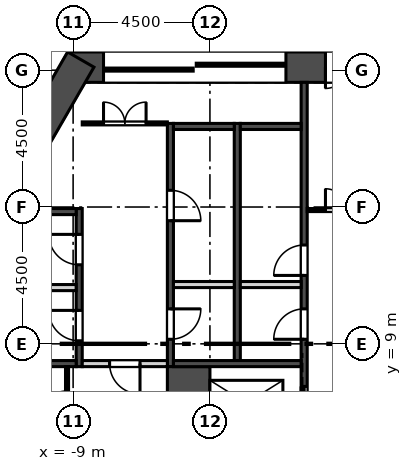
"""IFC4 building model, lengths in metres.
Left out: names, types, materials, properties, quantities, classifications, styles, units other than length and angle.
Written with IfcOpenShell. Run it as: python <this file> out.ifc"""

import sys

from ifc_helpers import new_model, si_unit, direction, frame, frame_2d, origin, place, context, subcontext, project, spatial, rectangle, extrude, element, fill, save


model = new_model("IFC4")
c1 = context("Model", 3, precision=1e-05, world=origin(), true_north=direction((0.0, 1.0)))
c2 = subcontext(c1, "Body", "Model", "MODEL_VIEW")
j1 = project(units=[si_unit("LENGTHUNIT", "METRE"), si_unit("PLANEANGLEUNIT", "RADIAN")], contexts=[c1])
p1 = place(None, origin())
s1 = spatial("IfcSite", under=j1, at=p1, CompositionType="ELEMENT")
p2 = place(p1, origin())
s2 = spatial("IfcBuilding", under=s1, at=p2, CompositionType="ELEMENT")
p3 = place(p2, frame((0.0, 0.0, 218.1)))
s3 = spatial("IfcBuildingStorey", under=s2, at=p3, CompositionType="ELEMENT", Elevation=218.1)
p4 = place(p3, frame((9.181, 18.1, 0.0), z_axis=(0.0, 0.0, 1.0), x_axis=(-1.0, 0.0, 0.0)))
e1 = element("IfcWall", 1, at=p4, inside=s3, PredefinedType="SHEAR", context=c2, shape_type="SweptSolid", body=[
    extrude(rectangle(XDim=18.361, YDim=1.0, at=frame_2d((9.181, 0.0))), origin(), (0.0, 0.0, 1.0), 5.4),
])
p5 = place(p4, frame((8.481, 0.0, 0.0)))
e2 = element("IfcOpeningElement", 2, at=p5, cuts=e1, PredefinedType="OPENING", context=c2, shape_type="SweptSolid", body=[
    extrude(rectangle(XDim=1.4, YDim=2.1, at=frame_2d((0.7, 1.05))), frame((0.0, 0.51, 0.0), z_axis=(0.0, -1.0, 0.0), x_axis=(1.0, 0.0, 0.0)), (0.0, 0.0, 1.0), 1.02),
])
p6 = place(p4, frame((11.181, 0.0, 0.0)))
e3 = element("IfcOpeningElement", 3, at=p6, cuts=e1, PredefinedType="OPENING", context=c2, shape_type="SweptSolid", body=[
    extrude(rectangle(XDim=6.0, YDim=2.4, at=frame_2d((3.0, 1.2))), frame((0.0, 0.51, 0.0), z_axis=(0.0, -1.0, 0.0), x_axis=(1.0, 0.0, 0.0)), (0.0, 0.0, 1.0), 1.02),
])
p7 = place(p4, frame((1.181, 0.0, 0.0)))
e4 = element("IfcOpeningElement", 4, at=p7, cuts=e1, PredefinedType="OPENING", context=c2, shape_type="SweptSolid", body=[
    extrude(rectangle(XDim=6.0, YDim=2.4, at=frame_2d((3.0, 1.2))), frame((0.0, 0.51, 0.0), z_axis=(0.0, -1.0, 0.0), x_axis=(1.0, 0.0, 0.0)), (0.0, 0.0, 1.0), 1.02),
])
p8 = place(p3, frame((-8.748, 18.35, 0.0), z_axis=(0.0, 0.0, 1.0), x_axis=(-0.499995021168, -0.866028278295, 0.0)))
e5 = element("IfcWall", 5, at=p8, inside=s3, PredefinedType="SHEAR", context=c2, shape_type="SweptSolid", body=[
    extrude(rectangle(XDim=8.839, YDim=1.0, at=frame_2d((4.419, 0.0))), origin(), (0.0, 0.0, 1.0), 5.4),
])
p9 = place(p3, frame((-4.353, 47.177, 0.0), z_axis=(0.0, 0.0, 1.0), x_axis=(-0.500000533701, -0.866025095652, 0.0)))
e6 = element("IfcWall", 6, at=p9, inside=s3, PredefinedType="SOLIDWALL", context=c2, shape_type="SweptSolid", body=[
    extrude(rectangle(XDim=45.573, YDim=0.34, at=frame_2d((22.787, 0.0))), origin(), (0.0, 0.0, 1.0), 5.0),
])
p10 = place(p9, frame((2.68, 0.0, 0.9)))
e7 = element("IfcOpeningElement", 7, at=p10, cuts=e6, PredefinedType="OPENING", context=c2, shape_type="SweptSolid", body=[
    extrude(rectangle(XDim=1.885, YDim=3.0, at=frame_2d((0.942, 1.5))), frame((0.0, 0.18, 0.0), z_axis=(0.0, -1.0, 0.0), x_axis=(1.0, 0.0, 0.0)), (0.0, 0.0, 1.0), 0.36),
])
p11 = place(p9, frame((5.68, 0.0, 0.9)))
e8 = element("IfcOpeningElement", 8, at=p11, cuts=e6, PredefinedType="OPENING", context=c2, shape_type="SweptSolid", body=[
    extrude(rectangle(XDim=1.885, YDim=3.0, at=frame_2d((0.942, 1.5))), frame((0.0, 0.18, 0.0), z_axis=(0.0, -1.0, 0.0), x_axis=(1.0, 0.0, 0.0)), (0.0, 0.0, 1.0), 0.36),
])
p12 = place(p9, frame((8.68, 0.0, 0.9)))
e9 = element("IfcOpeningElement", 9, at=p12, cuts=e6, PredefinedType="OPENING", context=c2, shape_type="SweptSolid", body=[
    extrude(rectangle(XDim=1.885, YDim=3.0, at=frame_2d((0.942, 1.5))), frame((0.0, 0.18, 0.0), z_axis=(0.0, -1.0, 0.0), x_axis=(1.0, 0.0, 0.0)), (0.0, 0.0, 1.0), 0.36),
])
p13 = place(p9, frame((11.68, 0.0, 0.9)))
e10 = element("IfcOpeningElement", 10, at=p13, cuts=e6, PredefinedType="OPENING", context=c2, shape_type="SweptSolid", body=[
    extrude(rectangle(XDim=1.885, YDim=3.0, at=frame_2d((0.942, 1.5))), frame((0.0, 0.18, 0.0), z_axis=(0.0, -1.0, 0.0), x_axis=(1.0, 0.0, 0.0)), (0.0, 0.0, 1.0), 0.36),
])
p14 = place(p9, frame((14.68, 0.0, 0.9)))
e11 = element("IfcOpeningElement", 11, at=p14, cuts=e6, PredefinedType="OPENING", context=c2, shape_type="SweptSolid", body=[
    extrude(rectangle(XDim=1.885, YDim=3.0, at=frame_2d((0.942, 1.5))), frame((0.0, 0.18, 0.0), z_axis=(0.0, -1.0, 0.0), x_axis=(1.0, 0.0, 0.0)), (0.0, 0.0, 1.0), 0.36),
])
p15 = place(p9, frame((17.68, 0.0, 0.9)))
e12 = element("IfcOpeningElement", 12, at=p15, cuts=e6, PredefinedType="OPENING", context=c2, shape_type="SweptSolid", body=[
    extrude(rectangle(XDim=1.885, YDim=3.0, at=frame_2d((0.942, 1.5))), frame((0.0, 0.18, 0.0), z_axis=(0.0, -1.0, 0.0), x_axis=(1.0, 0.0, 0.0)), (0.0, 0.0, 1.0), 0.36),
])
p16 = place(p9, frame((20.68, 0.0, 0.9)))
e13 = element("IfcOpeningElement", 13, at=p16, cuts=e6, PredefinedType="OPENING", context=c2, shape_type="SweptSolid", body=[
    extrude(rectangle(XDim=1.885, YDim=3.0, at=frame_2d((0.942, 1.5))), frame((0.0, 0.18, 0.0), z_axis=(0.0, -1.0, 0.0), x_axis=(1.0, 0.0, 0.0)), (0.0, 0.0, 1.0), 0.36),
])
p17 = place(p9, frame((23.68, 0.0, 0.9)))
e14 = element("IfcOpeningElement", 14, at=p17, cuts=e6, PredefinedType="OPENING", context=c2, shape_type="SweptSolid", body=[
    extrude(rectangle(XDim=1.885, YDim=3.0, at=frame_2d((0.942, 1.5))), frame((0.0, 0.18, 0.0), z_axis=(0.0, -1.0, 0.0), x_axis=(1.0, 0.0, 0.0)), (0.0, 0.0, 1.0), 0.36),
])
p18 = place(p9, frame((26.68, 0.0, 0.9)))
e15 = element("IfcOpeningElement", 15, at=p18, cuts=e6, PredefinedType="OPENING", context=c2, shape_type="SweptSolid", body=[
    extrude(rectangle(XDim=1.885, YDim=3.0, at=frame_2d((0.942, 1.5))), frame((0.0, 0.18, 0.0), z_axis=(0.0, -1.0, 0.0), x_axis=(1.0, 0.0, 0.0)), (0.0, 0.0, 1.0), 0.36),
])
p19 = place(p9, frame((29.68, 0.0, 0.9)))
e16 = element("IfcOpeningElement", 16, at=p19, cuts=e6, PredefinedType="OPENING", context=c2, shape_type="SweptSolid", body=[
    extrude(rectangle(XDim=1.885, YDim=3.0, at=frame_2d((0.942, 1.5))), frame((0.0, 0.18, 0.0), z_axis=(0.0, -1.0, 0.0), x_axis=(1.0, 0.0, 0.0)), (0.0, 0.0, 1.0), 0.36),
])
p20 = place(p9, frame((32.68, 0.0, 0.9)))
e17 = element("IfcOpeningElement", 17, at=p20, cuts=e6, PredefinedType="OPENING", context=c2, shape_type="SweptSolid", body=[
    extrude(rectangle(XDim=1.885, YDim=3.0, at=frame_2d((0.942, 1.5))), frame((0.0, 0.18, 0.0), z_axis=(0.0, -1.0, 0.0), x_axis=(1.0, 0.0, 0.0)), (0.0, 0.0, 1.0), 0.36),
])
p21 = place(p9, frame((35.68, 0.0, 0.9)))
e18 = element("IfcOpeningElement", 18, at=p21, cuts=e6, PredefinedType="OPENING", context=c2, shape_type="SweptSolid", body=[
    extrude(rectangle(XDim=1.885, YDim=3.0, at=frame_2d((0.942, 1.5))), frame((0.0, 0.18, 0.0), z_axis=(0.0, -1.0, 0.0), x_axis=(1.0, 0.0, 0.0)), (0.0, 0.0, 1.0), 0.36),
])
p22 = place(p9, frame((38.68, 0.0, 0.9)))
e19 = element("IfcOpeningElement", 19, at=p22, cuts=e6, PredefinedType="OPENING", context=c2, shape_type="SweptSolid", body=[
    extrude(rectangle(XDim=1.885, YDim=3.0, at=frame_2d((0.942, 1.5))), frame((0.0, 0.18, 0.0), z_axis=(0.0, -1.0, 0.0), x_axis=(1.0, 0.0, 0.0)), (0.0, 0.0, 1.0), 0.36),
])
p23 = place(p9, frame((41.68, 0.0, 0.9)))
e20 = element("IfcOpeningElement", 20, at=p23, cuts=e6, PredefinedType="OPENING", context=c2, shape_type="SweptSolid", body=[
    extrude(rectangle(XDim=1.885, YDim=3.0, at=frame_2d((0.942, 1.5))), frame((0.0, 0.18, 0.0), z_axis=(0.0, -1.0, 0.0), x_axis=(1.0, 0.0, 0.0)), (0.0, 0.0, 1.0), 0.36),
])
p24 = place(p3, frame((-8.8, 8.25, -0.4), z_axis=(0.0, 0.0, 1.0), x_axis=(0.0, 1.0, 0.0)))
e21 = element("IfcWall", 21, at=p24, inside=s3, PredefinedType="SOLIDWALL", context=c2, shape_type="SweptSolid", body=[
    extrude(rectangle(XDim=5.2, YDim=0.2, at=frame_2d((2.6, 0.0))), origin(), (0.0, 0.0, 1.0), 5.4),
])
p25 = place(p24, frame((0.85, 0.0, 0.4)))
e22 = element("IfcOpeningElement", 22, at=p25, cuts=e21, PredefinedType="OPENING", context=c2, shape_type="SweptSolid", body=[
    extrude(rectangle(XDim=1.0, YDim=2.1, at=frame_2d((0.5, 1.05))), frame((0.0, 0.11, 0.0), z_axis=(0.0, -1.0, 0.0), x_axis=(1.0, 0.0, 0.0)), (0.0, 0.0, 1.0), 0.22),
])
p26 = place(p24, frame((3.35, 0.0, 0.4)))
e23 = element("IfcOpeningElement", 23, at=p26, cuts=e21, PredefinedType="OPENING", context=c2, shape_type="SweptSolid", body=[
    extrude(rectangle(XDim=1.0, YDim=2.1, at=frame_2d((0.5, 1.05))), frame((0.0, 0.11, 0.0), z_axis=(0.0, -1.0, 0.0), x_axis=(1.0, 0.0, 0.0)), (0.0, 0.0, 1.0), 0.22),
])
p27 = place(p3, frame((-5.8, 8.25, -0.4), z_axis=(0.0, 0.0, 1.0), x_axis=(0.0, 1.0, 0.0)))
e24 = element("IfcWall", 24, at=p27, inside=s3, PredefinedType="SOLIDWALL", context=c2, shape_type="SweptSolid", body=[
    extrude(rectangle(XDim=8.0, YDim=0.2, at=frame_2d((4.0, 0.0))), origin(), (0.0, 0.0, 1.0), 5.4),
])
p28 = place(p27, frame((0.9, 0.0, 0.4)))
e25 = element("IfcOpeningElement", 25, at=p28, cuts=e24, PredefinedType="OPENING", context=c2, shape_type="SweptSolid", body=[
    extrude(rectangle(XDim=1.0, YDim=2.1, at=frame_2d((0.5, 1.05))), frame((0.0, 0.11, 0.0), z_axis=(0.0, -1.0, 0.0), x_axis=(1.0, 0.0, 0.0)), (0.0, 0.0, 1.0), 0.22),
])
p29 = place(p27, frame((4.8, 0.0, 0.4)))
e26 = element("IfcOpeningElement", 26, at=p29, cuts=e24, PredefinedType="OPENING", context=c2, shape_type="SweptSolid", body=[
    extrude(rectangle(XDim=1.0, YDim=2.1, at=frame_2d((0.5, 1.05))), frame((0.0, 0.11, 0.0), z_axis=(0.0, -1.0, 0.0), x_axis=(1.0, 0.0, 0.0)), (0.0, 0.0, 1.0), 0.22),
])
p30 = place(p3, frame((-3.6, 8.45, -0.4), z_axis=(0.0, 0.0, 1.0), x_axis=(0.0, 1.0, 0.0)))
e27 = element("IfcWall", 27, at=p30, inside=s3, PredefinedType="SOLIDWALL", context=c2, shape_type="SweptSolid", body=[
    extrude(rectangle(XDim=7.8, YDim=0.2, at=frame_2d((3.9, 0.0))), origin(), (0.0, 0.0, 1.0), 5.4),
])
p31 = place(p3, frame((-1.4, 5.85, -0.4), z_axis=(0.0, 0.0, 1.0), x_axis=(0.0, 1.0, 0.0)))
e28 = element("IfcWall", 28, at=p31, inside=s3, PredefinedType="SOLIDWALL", context=c2, shape_type="SweptSolid", body=[
    extrude(rectangle(XDim=11.75, YDim=0.2, at=frame_2d((5.875, 0.0))), origin(), (0.0, 0.0, 1.0), 5.4),
])
p32 = place(p31, frame((0.65, 0.0, 0.4)))
e29 = element("IfcOpeningElement", 29, at=p32, cuts=e28, PredefinedType="OPENING", context=c2, shape_type="SweptSolid", body=[
    extrude(rectangle(XDim=1.1, YDim=2.1, at=frame_2d((0.55, 1.05))), frame((0.0, 0.11, 0.0), z_axis=(0.0, -1.0, 0.0), x_axis=(1.0, 0.0, 0.0)), (0.0, 0.0, 1.0), 0.22),
])
p33 = place(p31, frame((3.3, 0.0, 0.4)))
e30 = element("IfcOpeningElement", 30, at=p33, cuts=e28, PredefinedType="OPENING", context=c2, shape_type="SweptSolid", body=[
    extrude(rectangle(XDim=1.0, YDim=2.1, at=frame_2d((0.5, 1.05))), frame((0.0, 0.11, 0.0), z_axis=(0.0, -1.0, 0.0), x_axis=(1.0, 0.0, 0.0)), (0.0, 0.0, 1.0), 0.22),
])
p34 = place(p31, frame((5.4, 0.0, 0.4)))
e31 = element("IfcOpeningElement", 31, at=p34, cuts=e28, PredefinedType="OPENING", context=c2, shape_type="SweptSolid", body=[
    extrude(rectangle(XDim=1.0, YDim=2.1, at=frame_2d((0.5, 1.05))), frame((0.0, 0.11, 0.0), z_axis=(0.0, -1.0, 0.0), x_axis=(1.0, 0.0, 0.0)), (0.0, 0.0, 1.0), 0.22),
])
p35 = place(p3, frame((-5.2, 5.85, -0.4), z_axis=(0.0, 0.0, 1.0), x_axis=(0.0, 1.0, 0.0)))
e32 = element("IfcWall", 32, at=p35, inside=s3, PredefinedType="SOLIDWALL", context=c2, shape_type="SweptSolid", body=[
    extrude(rectangle(XDim=2.4, YDim=1.4, at=frame_2d((1.2, 0.0))), origin(), (0.0, 0.0, 1.0), 5.4),
])
p36 = place(p3, frame((-10.9, 8.35, -0.4), z_axis=(0.0, 0.0, 1.0), x_axis=(1.0, 0.0, 0.0)))
e33 = element("IfcWall", 33, at=p36, inside=s3, PredefinedType="SOLIDWALL", context=c2, shape_type="SweptSolid", body=[
    extrude(rectangle(XDim=2.0, YDim=0.2, at=frame_2d((1.0, 0.0))), origin(), (0.0, 0.0, 1.0), 5.4),
])
p37 = place(p3, frame((-5.7, 8.35, -0.4), z_axis=(0.0, 0.0, 1.0), x_axis=(1.0, 0.0, 0.0)))
e34 = element("IfcWall", 34, at=p37, inside=s3, PredefinedType="SOLIDWALL", context=c2, shape_type="SweptSolid", body=[
    extrude(rectangle(XDim=4.2, YDim=0.2, at=frame_2d((2.1, 0.0))), origin(), (0.0, 0.0, 1.0), 5.4),
])
p38 = place(p3, frame((-10.9, 10.85, 0.0), z_axis=(0.0, 0.0, 1.0), x_axis=(1.0, 0.0, 0.0)))
e35 = element("IfcWall", 35, at=p38, inside=s3, PredefinedType="SOLIDWALL", context=c2, shape_type="SweptSolid", body=[
    extrude(rectangle(XDim=2.0, YDim=0.2, at=frame_2d((1.0, 0.0))), origin(), (0.0, 0.0, 1.0), 5.0),
])
p39 = place(p3, frame((-10.9, 13.35, -0.4), z_axis=(0.0, 0.0, 1.0), x_axis=(1.0, 0.0, 0.0)))
e36 = element("IfcWall", 36, at=p39, inside=s3, PredefinedType="SOLIDWALL", context=c2, shape_type="SweptSolid", body=[
    extrude(rectangle(XDim=2.0, YDim=0.2, at=frame_2d((1.0, 0.0))), origin(), (0.0, 0.0, 1.0), 5.4),
])
p40 = place(p3, frame((-5.7, 10.95, 0.0), z_axis=(0.0, 0.0, 1.0), x_axis=(1.0, 0.0, 0.0)))
e37 = element("IfcWall", 37, at=p40, inside=s3, PredefinedType="SOLIDWALL", context=c2, shape_type="SweptSolid", body=[
    extrude(rectangle(XDim=2.0, YDim=0.2, at=frame_2d((1.0, 0.0))), origin(), (0.0, 0.0, 1.0), 5.0),
])
p41 = place(p3, frame((-5.7, 16.15, -0.4), z_axis=(0.0, 0.0, 1.0), x_axis=(1.0, 0.0, 0.0)))
e38 = element("IfcWall", 38, at=p41, inside=s3, PredefinedType="SOLIDWALL", context=c2, shape_type="SweptSolid", body=[
    extrude(rectangle(XDim=2.0, YDim=0.2, at=frame_2d((1.0, 0.0))), origin(), (0.0, 0.0, 1.0), 5.4),
])
p42 = place(p3, frame((-3.5, 10.95, 0.0), z_axis=(0.0, 0.0, 1.0), x_axis=(1.0, 0.0, 0.0)))
e39 = element("IfcWall", 39, at=p42, inside=s3, PredefinedType="SOLIDWALL", context=c2, shape_type="SweptSolid", body=[
    extrude(rectangle(XDim=2.0, YDim=0.2, at=frame_2d((1.0, 0.0))), origin(), (0.0, 0.0, 1.0), 5.0),
])
p43 = place(p3, frame((-3.5, 16.15, -0.4), z_axis=(0.0, 0.0, 1.0), x_axis=(1.0, 0.0, 0.0)))
e40 = element("IfcWall", 40, at=p43, inside=s3, PredefinedType="SOLIDWALL", context=c2, shape_type="SweptSolid", body=[
    extrude(rectangle(XDim=2.0, YDim=0.2, at=frame_2d((1.0, 0.0))), origin(), (0.0, 0.0, 1.0), 5.4),
])
p44 = place(p3, frame((-8.7, 16.25, 0.0), z_axis=(0.0, 0.0, 1.0), x_axis=(1.0, 0.0, 0.0)))
e41 = element("IfcWall", 41, at=p44, inside=s3, PredefinedType="PARTITIONING", context=c2, shape_type="SweptSolid", body=[
    extrude(rectangle(XDim=2.8, YDim=0.1, at=frame_2d((1.4, 0.0))), origin(), (0.0, 0.0, 1.0), 5.0),
])
p45 = place(p44, frame((0.7, 0.0, 0.0)))
e42 = element("IfcOpeningElement", 42, at=p45, cuts=e41, PredefinedType="OPENING", context=c2, shape_type="SweptSolid", body=[
    extrude(rectangle(XDim=1.4, YDim=2.1, at=frame_2d((0.7, 1.05))), frame((0.0, 0.06, 0.0), z_axis=(0.0, -1.0, 0.0), x_axis=(1.0, 0.0, 0.0)), (0.0, 0.0, 1.0), 0.12),
])
p46 = place(p3, frame((-9.2, 5.85, 0.0), z_axis=(0.0, 0.0, 1.0), x_axis=(0.0, 1.0, 0.0)))
e43 = element("IfcWall", 43, at=p46, inside=s3, PredefinedType="PARTITIONING", context=c2, shape_type="SweptSolid", body=[
    extrude(rectangle(XDim=2.4, YDim=0.1, at=frame_2d((1.2, 0.0))), origin(), (0.0, 0.0, 1.0), 5.0),
])
p47 = place(p46, frame((0.7, 0.0, 0.0)))
e44 = element("IfcOpeningElement", 44, at=p47, cuts=e43, PredefinedType="OPENING", context=c2, shape_type="SweptSolid", body=[
    extrude(rectangle(XDim=0.9, YDim=2.1, at=frame_2d((0.45, 1.05))), frame((0.0, 0.06, 0.0), z_axis=(0.0, -1.0, 0.0), x_axis=(1.0, 0.0, 0.0)), (0.0, 0.0, 1.0), 0.12),
])
p48 = place(p3, frame((-8.7, 8.35, 0.0), z_axis=(0.0, 0.0, 1.0), x_axis=(1.0, 0.0, 0.0)))
e45 = element("IfcWall", 45, at=p48, inside=s3, PredefinedType="SOLIDWALL", context=c2, shape_type="SweptSolid", body=[
    extrude(rectangle(XDim=2.8, YDim=0.2, at=frame_2d((1.4, 0.0))), origin(), (0.0, 0.0, 1.0), 5.0),
])
p49 = place(p48, frame((0.9, 0.0, 0.0)))
e46 = element("IfcOpeningElement", 46, at=p49, cuts=e45, PredefinedType="OPENING", context=c2, shape_type="SweptSolid", body=[
    extrude(rectangle(XDim=1.0, YDim=2.1, at=frame_2d((0.5, 1.05))), frame((0.0, 0.11, 0.0), z_axis=(0.0, -1.0, 0.0), x_axis=(1.0, 0.0, 0.0)), (0.0, 0.0, 1.0), 0.22),
])
p50 = place(p3, frame((-1.3, 13.4, 0.0), z_axis=(0.0, 0.0, 1.0), x_axis=(1.0, 0.0, 0.0)))
e47 = element("IfcWall", 47, at=p50, inside=s3, PredefinedType="PARTITIONING", context=c2, shape_type="SweptSolid", body=[
    extrude(rectangle(XDim=2.6, YDim=0.1, at=frame_2d((1.3, 0.0))), origin(), (0.0, 0.0, 1.0), 5.0),
])
p51 = place(p50, frame((0.6, 0.0, 0.0)))
e48 = element("IfcOpeningElement", 48, at=p51, cuts=e47, PredefinedType="OPENING", context=c2, shape_type="SweptSolid", body=[
    extrude(rectangle(XDim=1.4, YDim=2.1, at=frame_2d((0.7, 1.05))), frame((0.0, 0.06, 0.0), z_axis=(0.0, -1.0, 0.0), x_axis=(1.0, 0.0, 0.0)), (0.0, 0.0, 1.0), 0.12),
])
p52 = place(p32, origin())
e49 = element("IfcDoor", 49, at=p52, inside=s3, OperationType="SLIDING_TO_RIGHT", PredefinedType="DOOR", context=c2, shape_type="SweptSolid", body=[
    extrude(rectangle(XDim=1.1, YDim=2.1, at=frame_2d((0.55, 1.05))), frame((0.0, 0.025, 0.0), z_axis=(0.0, -1.0, 0.0), x_axis=(1.0, 0.0, 0.0)), (0.0, 0.0, 1.0), 0.05),
])
fill(e29, e49)
p53 = place(p25, origin())
e50 = element("IfcDoor", 50, at=p53, inside=s3, OperationType="SINGLE_SWING_RIGHT", PredefinedType="DOOR", context=c2, shape_type="SweptSolid", body=[
    extrude(rectangle(XDim=1.0, YDim=2.1, at=frame_2d((0.5, 1.05))), frame((0.0, 0.025, 0.0), z_axis=(0.0, -1.0, 0.0), x_axis=(1.0, 0.0, 0.0)), (0.0, 0.0, 1.0), 0.05),
])
fill(e22, e50)
p54 = place(p26, origin())
e51 = element("IfcDoor", 51, at=p54, inside=s3, OperationType="SINGLE_SWING_RIGHT", PredefinedType="DOOR", context=c2, shape_type="SweptSolid", body=[
    extrude(rectangle(XDim=1.0, YDim=2.1, at=frame_2d((0.5, 1.05))), frame((0.0, 0.025, 0.0), z_axis=(0.0, -1.0, 0.0), x_axis=(1.0, 0.0, 0.0)), (0.0, 0.0, 1.0), 0.05),
])
fill(e23, e51)
p55 = place(p28, frame((1.0, 0.0, 0.0), z_axis=(0.0, 0.0, 1.0), x_axis=(-1.0, 0.0, 0.0)))
e52 = element("IfcDoor", 52, at=p55, inside=s3, OperationType="SINGLE_SWING_LEFT", PredefinedType="DOOR", context=c2, shape_type="SweptSolid", body=[
    extrude(rectangle(XDim=1.0, YDim=2.1, at=frame_2d((0.5, 1.05))), frame((0.0, 0.025, 0.0), z_axis=(0.0, -1.0, 0.0), x_axis=(1.0, 0.0, 0.0)), (0.0, 0.0, 1.0), 0.05),
])
fill(e25, e52)
p56 = place(p29, frame((1.0, 0.0, 0.0), z_axis=(0.0, 0.0, 1.0), x_axis=(-1.0, 0.0, 0.0)))
e53 = element("IfcDoor", 53, at=p56, inside=s3, OperationType="SINGLE_SWING_RIGHT", PredefinedType="DOOR", context=c2, shape_type="SweptSolid", body=[
    extrude(rectangle(XDim=1.0, YDim=2.1, at=frame_2d((0.5, 1.05))), frame((0.0, 0.025, 0.0), z_axis=(0.0, -1.0, 0.0), x_axis=(1.0, 0.0, 0.0)), (0.0, 0.0, 1.0), 0.05),
])
fill(e26, e53)
p57 = place(p33, origin())
e54 = element("IfcDoor", 54, at=p57, inside=s3, OperationType="SINGLE_SWING_LEFT", PredefinedType="DOOR", context=c2, shape_type="SweptSolid", body=[
    extrude(rectangle(XDim=1.0, YDim=2.1, at=frame_2d((0.5, 1.05))), frame((0.0, 0.025, 0.0), z_axis=(0.0, -1.0, 0.0), x_axis=(1.0, 0.0, 0.0)), (0.0, 0.0, 1.0), 0.05),
])
fill(e30, e54)
p58 = place(p34, origin())
e55 = element("IfcDoor", 55, at=p58, inside=s3, OperationType="SINGLE_SWING_LEFT", PredefinedType="DOOR", context=c2, shape_type="SweptSolid", body=[
    extrude(rectangle(XDim=1.0, YDim=2.1, at=frame_2d((0.5, 1.05))), frame((0.0, 0.025, 0.0), z_axis=(0.0, -1.0, 0.0), x_axis=(1.0, 0.0, 0.0)), (0.0, 0.0, 1.0), 0.05),
])
fill(e31, e55)
p59 = place(p45, origin())
e56 = element("IfcDoor", 56, at=p59, inside=s3, OperationType="DOUBLE_DOOR_SINGLE_SWING", PredefinedType="DOOR", context=c2, shape_type="SweptSolid", body=[
    extrude(rectangle(XDim=1.4, YDim=2.1, at=frame_2d((0.7, 1.05))), frame((0.0, 0.025, 0.0), z_axis=(0.0, -1.0, 0.0), x_axis=(1.0, 0.0, 0.0)), (0.0, 0.0, 1.0), 0.05),
])
fill(e42, e56)
p60 = place(p49, frame((1.0, 0.0, 0.0), z_axis=(0.0, 0.0, 1.0), x_axis=(-1.0, 0.0, 0.0)))
e57 = element("IfcDoor", 57, at=p60, inside=s3, OperationType="SINGLE_SWING_LEFT", PredefinedType="DOOR", context=c2, shape_type="SweptSolid", body=[
    extrude(rectangle(XDim=1.0, YDim=2.1, at=frame_2d((0.5, 1.05))), frame((0.0, 0.025, 0.0), z_axis=(0.0, -1.0, 0.0), x_axis=(1.0, 0.0, 0.0)), (0.0, 0.0, 1.0), 0.05),
])
fill(e46, e57)
p61 = place(p51, origin())
e58 = element("IfcDoor", 58, at=p61, inside=s3, OperationType="DOUBLE_DOOR_SINGLE_SWING", PredefinedType="DOOR", context=c2, shape_type="SweptSolid", body=[
    extrude(rectangle(XDim=1.4, YDim=2.1, at=frame_2d((0.7, 1.05))), frame((0.0, 0.025, 0.0), z_axis=(0.0, -1.0, 0.0), x_axis=(1.0, 0.0, 0.0)), (0.0, 0.0, 1.0), 0.05),
])
fill(e48, e58)
p62 = place(p5, origin())
e59 = element("IfcDoor", 59, at=p62, inside=s3, OperationType="DOUBLE_DOOR_SINGLE_SWING", PredefinedType="DOOR", context=c2, shape_type="SweptSolid", body=[
    extrude(rectangle(XDim=1.4, YDim=2.1, at=frame_2d((0.7, 1.05))), frame((0.0, 0.025, 0.0), z_axis=(0.0, -1.0, 0.0), x_axis=(1.0, 0.0, 0.0)), (0.0, 0.0, 1.0), 0.05),
])
fill(e2, e59)
p63 = place(p6, origin())
e60 = element("IfcDoor", 60, at=p63, inside=s3, OperationType="DOUBLE_DOOR_SLIDING", PredefinedType="DOOR", context=c2, shape_type="SweptSolid", body=[
    extrude(rectangle(XDim=6.0, YDim=2.4, at=frame_2d((3.0, 1.2))), frame((0.0, 0.025, 0.0), z_axis=(0.0, -1.0, 0.0), x_axis=(1.0, 0.0, 0.0)), (0.0, 0.0, 1.0), 0.05),
])
fill(e3, e60)
save(model, sys.argv[1])
